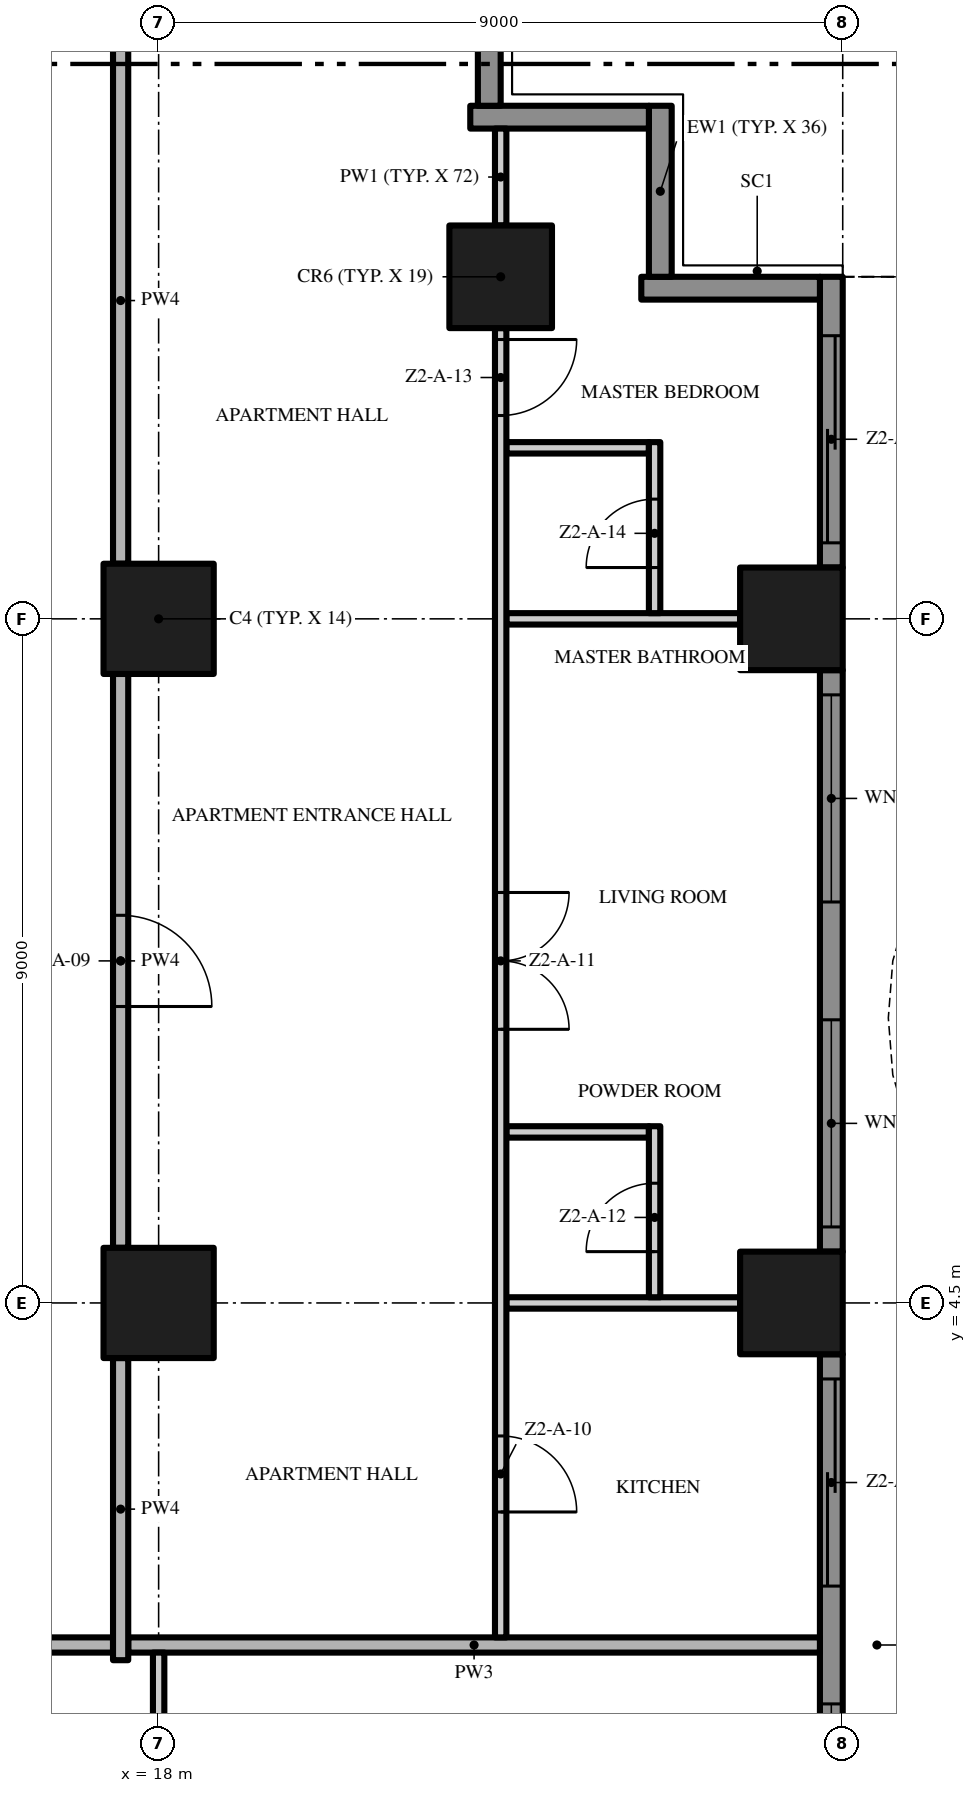
"""IFC4 building model, lengths in metres.
Left out: names, types, materials, properties, quantities, classifications, styles, units other than length and angle.
Written with IfcOpenShell. Run it as: python <this file> out.ifc"""

import sys

from ifc_helpers import new_model, si_unit, direction, frame, frame_2d, origin, origin_2d, place, context, subcontext, project, spatial, polyline, rectangle, outline, extrude, element, fill, save


model = new_model("IFC4")
c1 = context("Model", 3, precision=1e-05, world=origin(), true_north=direction((0.0, 1.0)))
c2 = subcontext(c1, "Body", "Model", "MODEL_VIEW")
j1 = project(units=[si_unit("LENGTHUNIT", "METRE"), si_unit("PLANEANGLEUNIT", "RADIAN")], contexts=[c1])
p1 = place(None, origin())
s1 = spatial("IfcSite", under=j1, at=p1, CompositionType="ELEMENT")
p2 = place(p1, origin())
s2 = spatial("IfcBuilding", under=s1, at=p2, CompositionType="ELEMENT")
p3 = place(p2, frame((0.0, 0.0, 77.0)))
s3 = spatial("IfcBuildingStorey", under=s2, at=p3, CompositionType="ELEMENT", Elevation=77.0)
for number, where, z_axis, x_axis in (
    (1, (18.0, 13.5, 0.0), (0.0, 0.0, 1.0), (1.0, 0.0, 0.0)),
    (2, (18.0, 4.5, 0.0), (0.0, 0.0, 1.0), (1.0, 0.0, 0.0)),
):
    element("IfcColumn", number, at=place(p3, frame(where, z_axis=z_axis, x_axis=x_axis)), inside=s3, PredefinedType="COLUMN", context=c2, shape_type="SweptSolid", body=[
        extrude(rectangle(XDim=1.45, YDim=1.45, at=origin_2d()), origin(), (0.0, 0.0, 1.0), 3.5),
    ])
for number, where, z_axis, x_axis in (
    (3, (26.325, 13.5, 0.0), (0.0, 0.0, 1.0), (1.0, 0.0, 0.0)),
    (4, (22.5, 18.0, 0.0), (0.0, 0.0, 1.0), (1.0, 0.0, 0.0)),
    (5, (26.325, 4.5, 0.0), (0.0, 0.0, 1.0), (1.0, 0.0, 0.0)),
):
    element("IfcColumn", number, at=place(p3, frame(where, z_axis=z_axis, x_axis=x_axis)), inside=s3, PredefinedType="COLUMN", context=c2, shape_type="SweptSolid", body=[
        extrude(rectangle(XDim=1.35, YDim=1.35, at=origin_2d()), origin(), (0.0, 0.0, 1.0), 3.5),
    ])
p4 = place(p3, frame((26.85, 3.825, 0.0), z_axis=(0.0, 0.0, 1.0), x_axis=(0.0, -1.0, 0.0)))
e6 = element("IfcWall", 6, at=p4, inside=s3, PredefinedType="SOLIDWALL", context=c2, shape_type="SweptSolid", body=[
    extrude(rectangle(XDim=7.65, YDim=0.3, at=frame_2d((3.825, 0.0))), origin(), (0.0, 0.0, 1.0), 3.5),
])
p5 = place(p4, frame((4.6, 0.0, 0.45)))
e7 = element("IfcOpeningElement", 7, at=p5, cuts=e6, PredefinedType="OPENING", context=c2, shape_type="SweptSolid", body=[
    extrude(rectangle(XDim=2.725, YDim=2.65, at=frame_2d((1.363, 1.325))), frame((0.0, 0.16, 0.0), z_axis=(0.0, -1.0, 0.0), x_axis=(1.0, 0.0, 0.0)), (0.0, 0.0, 1.0), 0.32),
])
p6 = place(p4, frame((0.325, 0.0, 0.0)))
e8 = element("IfcOpeningElement", 8, at=p6, cuts=e6, PredefinedType="OPENING", context=c2, shape_type="SweptSolid", body=[
    extrude(rectangle(XDim=2.725, YDim=2.4, at=frame_2d((1.363, 1.2))), frame((0.0, 0.16, 0.0), z_axis=(0.0, -1.0, 0.0), x_axis=(1.0, 0.0, 0.0)), (0.0, 0.0, 1.0), 0.32),
])
p7 = place(p3, frame((26.85, 12.825, 0.0), z_axis=(0.0, 0.0, 1.0), x_axis=(0.0, -1.0, 0.0)))
e9 = element("IfcWall", 9, at=p7, inside=s3, PredefinedType="SOLIDWALL", context=c2, shape_type="SweptSolid", body=[
    extrude(rectangle(XDim=7.65, YDim=0.3, at=frame_2d((3.825, 0.0))), origin(), (0.0, 0.0, 1.0), 3.5),
])
p8 = place(p7, frame((4.6, 0.0, 0.45)))
e10 = element("IfcOpeningElement", 10, at=p8, cuts=e9, PredefinedType="OPENING", context=c2, shape_type="SweptSolid", body=[
    extrude(rectangle(XDim=2.725, YDim=2.65, at=frame_2d((1.363, 1.325))), frame((0.0, 0.16, 0.0), z_axis=(0.0, -1.0, 0.0), x_axis=(1.0, 0.0, 0.0)), (0.0, 0.0, 1.0), 0.32),
])
p9 = place(p7, frame((0.325, 0.0, 0.45)))
e11 = element("IfcOpeningElement", 11, at=p9, cuts=e9, PredefinedType="OPENING", context=c2, shape_type="SweptSolid", body=[
    extrude(rectangle(XDim=2.725, YDim=2.65, at=frame_2d((1.363, 1.325))), frame((0.0, 0.16, 0.0), z_axis=(0.0, -1.0, 0.0), x_axis=(1.0, 0.0, 0.0)), (0.0, 0.0, 1.0), 0.32),
])
p10 = place(p3, frame((26.85, 18.0, 0.0), z_axis=(0.0, 0.0, 1.0), x_axis=(0.0, -1.0, 0.0)))
e12 = element("IfcWall", 12, at=p10, inside=s3, PredefinedType="SOLIDWALL", context=c2, shape_type="SweptSolid", body=[
    extrude(rectangle(XDim=3.825, YDim=0.3, at=frame_2d((1.913, 0.0))), origin(), (0.0, 0.0, 1.0), 3.5),
])
p11 = place(p10, frame((0.775, 0.0, 0.0)))
e13 = element("IfcOpeningElement", 13, at=p11, cuts=e12, PredefinedType="OPENING", context=c2, shape_type="SweptSolid", body=[
    extrude(rectangle(XDim=2.725, YDim=2.4, at=frame_2d((1.363, 1.2))), frame((0.0, 0.16, 0.0), z_axis=(0.0, -1.0, 0.0), x_axis=(1.0, 0.0, 0.0)), (0.0, 0.0, 1.0), 0.32),
])
p12 = place(p3, frame((24.35, 17.85, 0.0), z_axis=(0.0, 0.0, 1.0), x_axis=(1.0, 0.0, 0.0)))
e14 = element("IfcWall", 14, at=p12, inside=s3, PredefinedType="SOLIDWALL", context=c2, shape_type="SweptSolid", body=[
    extrude(rectangle(XDim=2.35, YDim=0.3, at=frame_2d((1.175, 0.0))), origin(), (0.0, 0.0, 1.0), 3.5),
])
p13 = place(p3, frame((24.6, 20.25, 0.0), z_axis=(0.0, 0.0, 1.0), x_axis=(0.0, -1.0, 0.0)))
e15 = element("IfcWall", 15, at=p13, inside=s3, PredefinedType="SOLIDWALL", context=c2, shape_type="SweptSolid", body=[
    extrude(rectangle(XDim=2.25, YDim=0.3, at=frame_2d((1.125, 0.0))), origin(), (0.0, 0.0, 1.0), 3.5),
])
p14 = place(p3, frame((22.1, 20.1, 0.0), z_axis=(0.0, 0.0, 1.0), x_axis=(1.0, 0.0, 0.0)))
e16 = element("IfcWall", 16, at=p14, inside=s3, PredefinedType="SOLIDWALL", context=c2, shape_type="SweptSolid", body=[
    extrude(rectangle(XDim=2.35, YDim=0.3, at=frame_2d((1.175, 0.0))), origin(), (0.0, 0.0, 1.0), 3.5),
])
p15 = place(p3, frame((22.35, 22.5, 0.0), z_axis=(0.0, 0.0, 1.0), x_axis=(0.0, -1.0, 0.0)))
e17 = element("IfcWall", 17, at=p15, inside=s3, PredefinedType="SOLIDWALL", context=c2, shape_type="SweptSolid", body=[
    extrude(rectangle(XDim=2.25, YDim=0.3, at=frame_2d((1.125, 0.0))), origin(), (0.0, 0.0, 1.0), 3.5),
])
p16 = place(p3, origin())
e18 = element("IfcWall", 18, at=p16, inside=s3, PredefinedType="USERDEFINED", context=c2, shape_type="SweptSolid", body=[
    extrude(outline(polyline([(28.8, -18.0), (29.505, -16.5), (29.941, -15.0), (30.0, -14.25), (29.941, -13.5), (29.505, -12.0), (28.8, -10.5), (28.095, -9.0), (27.659, -7.5), (27.6, -6.75), (27.659, -6.0), (28.095, -4.5), (28.8, -3.0), (29.505, -1.5), (29.941, 0.0), (30.0, 0.75), (29.941, 1.5), (29.505, 3.0), (28.8, 4.5), (28.095, 6.0), (27.659, 7.5), (27.6, 8.25), (27.659, 9.0), (28.095, 10.5), (28.8, 12.0), (29.505, 13.5), (29.941, 15.0), (30.0, 15.75), (29.941, 16.5), (29.505, 18.0), (29.265, 17.93), (29.694, 16.455), (29.749, 15.75), (29.694, 15.045), (29.271, 13.589), (28.574, 12.106), (27.86, 10.589), (27.411, 9.045), (27.349, 8.25), (27.411, 7.455), (27.86, 5.911), (28.574, 4.394), (29.271, 2.911), (29.694, 1.455), (29.749, 0.75), (29.694, 0.045), (29.271, -1.411), (28.574, -2.894), (27.86, -4.411), (27.411, -5.955), (27.349, -6.75), (27.411, -7.545), (27.86, -9.089), (28.574, -10.606), (29.271, -12.089), (29.694, -13.545), (29.749, -14.25), (29.694, -14.955), (29.271, -16.411), (28.574, -17.894), (28.8, -18.0)])), origin(), (0.0, 0.0, 1.0), 0.9),
])
p17 = place(p3, frame((4.6, 0.0, 0.0), z_axis=(0.0, 0.0, 1.0), x_axis=(1.0, 0.0, 0.0)))
e19 = element("IfcWall", 19, at=p17, inside=s3, PredefinedType="PARTITIONING", context=c2, shape_type="SweptSolid", body=[
    extrude(rectangle(XDim=12.8, YDim=0.2, at=frame_2d((6.4, 0.0))), origin(), (0.0, 0.0, 1.0), 3.5),
])
p18 = place(p3, frame((17.6, 0.0, 0.0), z_axis=(0.0, 0.0, 1.0), x_axis=(1.0, 0.0, 0.0)))
e20 = element("IfcWall", 20, at=p18, inside=s3, PredefinedType="PARTITIONING", context=c2, shape_type="SweptSolid", body=[
    extrude(rectangle(XDim=9.1, YDim=0.2, at=frame_2d((4.55, 0.0))), origin(), (0.0, 0.0, 1.0), 3.5),
])
p19 = place(p3, frame((22.575, 4.5, 0.0), z_axis=(0.0, 0.0, 1.0), x_axis=(1.0, 0.0, 0.0)))
e21 = element("IfcWall", 21, at=p19, inside=s3, PredefinedType="PARTITIONING", context=c2, shape_type="SweptSolid", body=[
    extrude(rectangle(XDim=3.075, YDim=0.15, at=frame_2d((1.538, 0.0))), origin(), (0.0, 0.0, 1.0), 3.5),
])
p20 = place(p3, frame((22.575, 6.75, 0.0), z_axis=(0.0, 0.0, 1.0), x_axis=(1.0, 0.0, 0.0)))
e22 = element("IfcWall", 22, at=p20, inside=s3, PredefinedType="PARTITIONING", context=c2, shape_type="SweptSolid", body=[
    extrude(rectangle(XDim=1.875, YDim=0.15, at=frame_2d((0.938, 0.0))), origin(), (0.0, 0.0, 1.0), 3.5),
])
p21 = place(p3, frame((22.575, 13.5, 0.0), z_axis=(0.0, 0.0, 1.0), x_axis=(1.0, 0.0, 0.0)))
e23 = element("IfcWall", 23, at=p21, inside=s3, PredefinedType="PARTITIONING", context=c2, shape_type="SweptSolid", body=[
    extrude(rectangle(XDim=3.075, YDim=0.15, at=frame_2d((1.538, 0.0))), origin(), (0.0, 0.0, 1.0), 3.5),
])
p22 = place(p3, frame((22.575, 15.75, 0.0), z_axis=(0.0, 0.0, 1.0), x_axis=(1.0, 0.0, 0.0)))
e24 = element("IfcWall", 24, at=p22, inside=s3, PredefinedType="PARTITIONING", context=c2, shape_type="SweptSolid", body=[
    extrude(rectangle(XDim=1.875, YDim=0.15, at=frame_2d((0.938, 0.0))), origin(), (0.0, 0.0, 1.0), 3.5),
])
p23 = place(p3, frame((17.5, -0.2, 0.0), z_axis=(0.0, 0.0, 1.0), x_axis=(0.0, 1.0, 0.0)))
e25 = element("IfcWall", 25, at=p23, inside=s3, PredefinedType="PARTITIONING", context=c2, shape_type="SweptSolid", body=[
    extrude(rectangle(XDim=3.975, YDim=0.2, at=frame_2d((1.988, 0.0))), origin(), (0.0, 0.0, 1.0), 3.5),
])
p24 = place(p3, frame((17.5, 12.775, 0.0), z_axis=(0.0, 0.0, 1.0), x_axis=(0.0, -1.0, 0.0)))
e26 = element("IfcWall", 26, at=p24, inside=s3, PredefinedType="PARTITIONING", context=c2, shape_type="SweptSolid", body=[
    extrude(rectangle(XDim=7.55, YDim=0.2, at=frame_2d((3.775, 0.0))), origin(), (0.0, 0.0, 1.0), 3.5),
])
p25 = place(p24, frame((3.175, 0.0, 0.0)))
e27 = element("IfcOpeningElement", 27, at=p25, cuts=e26, PredefinedType="OPENING", context=c2, shape_type="SweptSolid", body=[
    extrude(rectangle(XDim=1.2, YDim=2.4, at=frame_2d((0.6, 1.2))), frame((0.0, 0.11, 0.0), z_axis=(0.0, -1.0, 0.0), x_axis=(1.0, 0.0, 0.0)), (0.0, 0.0, 1.0), 0.22),
])
p26 = place(p3, frame((17.5, 14.225, 0.0), z_axis=(0.0, 0.0, 1.0), x_axis=(0.0, 1.0, 0.0)))
e28 = element("IfcWall", 28, at=p26, inside=s3, PredefinedType="PARTITIONING", context=c2, shape_type="SweptSolid", body=[
    extrude(rectangle(XDim=6.925, YDim=0.2, at=frame_2d((3.462, 0.0))), origin(), (0.0, 0.0, 1.0), 3.5),
])
p27 = place(p3, frame((18.0, -0.1, 0.0), z_axis=(0.0, 0.0, 1.0), x_axis=(0.0, -1.0, 0.0)))
e29 = element("IfcWall", 29, at=p27, inside=s3, PredefinedType="PARTITIONING", context=c2, shape_type="SweptSolid", body=[
    extrude(rectangle(XDim=3.675, YDim=0.15, at=frame_2d((1.837, 0.0))), origin(), (0.0, 0.0, 1.0), 3.5),
])
p28 = place(p27, frame((1.675, 0.0, 0.0)))
e30 = element("IfcOpeningElement", 30, at=p28, cuts=e29, PredefinedType="OPENING", context=c2, shape_type="SweptSolid", body=[
    extrude(rectangle(XDim=1.0, YDim=2.4, at=frame_2d((0.5, 1.2))), frame((0.0, 0.085, 0.0), z_axis=(0.0, -1.0, 0.0), x_axis=(1.0, 0.0, 0.0)), (0.0, 0.0, 1.0), 0.17),
])
p29 = place(p3, frame((22.5, 17.325, 0.0), z_axis=(0.0, 0.0, 1.0), x_axis=(0.0, -1.0, 0.0)))
e31 = element("IfcWall", 31, at=p29, inside=s3, PredefinedType="PARTITIONING", context=c2, shape_type="SweptSolid", body=[
    extrude(rectangle(XDim=17.225, YDim=0.15, at=frame_2d((8.613, 0.0))), origin(), (0.0, 0.0, 1.0), 3.5),
])
p30 = place(p29, frame((14.575, 0.0, 0.0)))
e32 = element("IfcOpeningElement", 32, at=p30, cuts=e31, PredefinedType="OPENING", context=c2, shape_type="SweptSolid", body=[
    extrude(rectangle(XDim=1.0, YDim=2.4, at=frame_2d((0.5, 1.2))), frame((0.0, 0.085, 0.0), z_axis=(0.0, -1.0, 0.0), x_axis=(1.0, 0.0, 0.0)), (0.0, 0.0, 1.0), 0.17),
])
p31 = place(p29, frame((7.425, 0.0, 0.0)))
e33 = element("IfcOpeningElement", 33, at=p31, cuts=e31, PredefinedType="OPENING", context=c2, shape_type="SweptSolid", body=[
    extrude(rectangle(XDim=1.8, YDim=2.4, at=frame_2d((0.9, 1.2))), frame((0.0, 0.085, 0.0), z_axis=(0.0, -1.0, 0.0), x_axis=(1.0, 0.0, 0.0)), (0.0, 0.0, 1.0), 0.17),
])
p32 = place(p29, frame((0.15, 0.0, 0.0)))
e34 = element("IfcOpeningElement", 34, at=p32, cuts=e31, PredefinedType="OPENING", context=c2, shape_type="SweptSolid", body=[
    extrude(rectangle(XDim=1.0, YDim=2.4, at=frame_2d((0.5, 1.2))), frame((0.0, 0.085, 0.0), z_axis=(0.0, -1.0, 0.0), x_axis=(1.0, 0.0, 0.0)), (0.0, 0.0, 1.0), 0.17),
])
p33 = place(p3, frame((22.5, 18.675, 0.0), z_axis=(0.0, 0.0, 1.0), x_axis=(0.0, 1.0, 0.0)))
e35 = element("IfcWall", 35, at=p33, inside=s3, PredefinedType="PARTITIONING", context=c2, shape_type="SweptSolid", body=[
    extrude(rectangle(XDim=1.275, YDim=0.15, at=frame_2d((0.637, 0.0))), origin(), (0.0, 0.0, 1.0), 3.5),
])
p34 = place(p3, frame((24.525, 4.575, 0.0), z_axis=(0.0, 0.0, 1.0), x_axis=(0.0, 1.0, 0.0)))
e36 = element("IfcWall", 36, at=p34, inside=s3, PredefinedType="PARTITIONING", context=c2, shape_type="SweptSolid", body=[
    extrude(rectangle(XDim=2.25, YDim=0.15, at=frame_2d((1.125, 0.0))), origin(), (0.0, 0.0, 1.0), 3.5),
])
p35 = place(p34, frame((0.6, 0.0, 0.0)))
e37 = element("IfcOpeningElement", 37, at=p35, cuts=e36, PredefinedType="OPENING", context=c2, shape_type="SweptSolid", body=[
    extrude(rectangle(XDim=0.9, YDim=2.1, at=frame_2d((0.45, 1.05))), frame((0.0, 0.085, 0.0), z_axis=(0.0, -1.0, 0.0), x_axis=(1.0, 0.0, 0.0)), (0.0, 0.0, 1.0), 0.17),
])
p36 = place(p3, frame((24.525, 13.575, 0.0), z_axis=(0.0, 0.0, 1.0), x_axis=(0.0, 1.0, 0.0)))
e38 = element("IfcWall", 38, at=p36, inside=s3, PredefinedType="PARTITIONING", context=c2, shape_type="SweptSolid", body=[
    extrude(rectangle(XDim=2.25, YDim=0.15, at=frame_2d((1.125, 0.0))), origin(), (0.0, 0.0, 1.0), 3.5),
])
p37 = place(p36, frame((0.6, 0.0, 0.0)))
e39 = element("IfcOpeningElement", 39, at=p37, cuts=e38, PredefinedType="OPENING", context=c2, shape_type="SweptSolid", body=[
    extrude(rectangle(XDim=0.9, YDim=2.1, at=frame_2d((0.45, 1.05))), frame((0.0, 0.085, 0.0), z_axis=(0.0, -1.0, 0.0), x_axis=(1.0, 0.0, 0.0)), (0.0, 0.0, 1.0), 0.17),
])
p38 = place(p5, origin())
e40 = element("IfcWindow", 40, at=p38, inside=s3, PartitioningType="SINGLE_PANEL", PredefinedType="WINDOW", context=c2, shape_type="SweptSolid", body=[
    extrude(rectangle(XDim=2.725, YDim=2.65, at=frame_2d((1.363, 1.325))), frame((0.0, 0.03, 0.0), z_axis=(0.0, -1.0, 0.0), x_axis=(1.0, 0.0, 0.0)), (0.0, 0.0, 1.0), 0.06),
])
fill(e7, e40)
p39 = place(p6, origin())
e41 = element("IfcDoor", 41, at=p39, inside=s3, OperationType="SINGLE_SWING_LEFT", PredefinedType="DOOR", context=c2, shape_type="SweptSolid", body=[
    extrude(rectangle(XDim=2.725, YDim=2.4, at=frame_2d((1.363, 1.2))), frame((0.0, 0.025, 0.0), z_axis=(0.0, -1.0, 0.0), x_axis=(1.0, 0.0, 0.0)), (0.0, 0.0, 1.0), 0.05),
])
fill(e8, e41)
p40 = place(p8, origin())
e42 = element("IfcWindow", 42, at=p40, inside=s3, PartitioningType="SINGLE_PANEL", PredefinedType="WINDOW", context=c2, shape_type="SweptSolid", body=[
    extrude(rectangle(XDim=2.725, YDim=2.65, at=frame_2d((1.363, 1.325))), frame((0.0, 0.03, 0.0), z_axis=(0.0, -1.0, 0.0), x_axis=(1.0, 0.0, 0.0)), (0.0, 0.0, 1.0), 0.06),
])
fill(e10, e42)
p41 = place(p9, origin())
e43 = element("IfcWindow", 43, at=p41, inside=s3, PartitioningType="SINGLE_PANEL", PredefinedType="WINDOW", context=c2, shape_type="SweptSolid", body=[
    extrude(rectangle(XDim=2.725, YDim=2.65, at=frame_2d((1.363, 1.325))), frame((0.0, 0.03, 0.0), z_axis=(0.0, -1.0, 0.0), x_axis=(1.0, 0.0, 0.0)), (0.0, 0.0, 1.0), 0.06),
])
fill(e11, e43)
p42 = place(p11, origin())
e44 = element("IfcDoor", 44, at=p42, inside=s3, OperationType="SINGLE_SWING_LEFT", PredefinedType="DOOR", context=c2, shape_type="SweptSolid", body=[
    extrude(rectangle(XDim=2.725, YDim=2.4, at=frame_2d((1.363, 1.2))), frame((0.0, 0.025, 0.0), z_axis=(0.0, -1.0, 0.0), x_axis=(1.0, 0.0, 0.0)), (0.0, 0.0, 1.0), 0.05),
])
fill(e13, e44)
p43 = place(p25, origin())
e45 = element("IfcDoor", 45, at=p43, inside=s3, OperationType="SINGLE_SWING_RIGHT", PredefinedType="DOOR", context=c2, shape_type="SweptSolid", body=[
    extrude(rectangle(XDim=1.2, YDim=2.4, at=frame_2d((0.6, 1.2))), frame((0.0, 0.025, 0.0), z_axis=(0.0, -1.0, 0.0), x_axis=(1.0, 0.0, 0.0)), (0.0, 0.0, 1.0), 0.05),
])
fill(e27, e45)
p44 = place(p30, origin())
e46 = element("IfcDoor", 46, at=p44, inside=s3, OperationType="SINGLE_SWING_RIGHT", PredefinedType="DOOR", context=c2, shape_type="SweptSolid", body=[
    extrude(rectangle(XDim=1.0, YDim=2.4, at=frame_2d((0.5, 1.2))), frame((0.0, 0.025, 0.0), z_axis=(0.0, -1.0, 0.0), x_axis=(1.0, 0.0, 0.0)), (0.0, 0.0, 1.0), 0.05),
])
fill(e32, e46)
p45 = place(p31, origin())
e47 = element("IfcDoor", 47, at=p45, inside=s3, OperationType="DOUBLE_DOOR_SINGLE_SWING", PredefinedType="DOOR", context=c2, shape_type="SweptSolid", body=[
    extrude(rectangle(XDim=1.8, YDim=2.4, at=frame_2d((0.9, 1.2))), frame((0.0, 0.025, 0.0), z_axis=(0.0, -1.0, 0.0), x_axis=(1.0, 0.0, 0.0)), (0.0, 0.0, 1.0), 0.05),
])
fill(e33, e47)
p46 = place(p35, origin())
e48 = element("IfcDoor", 48, at=p46, inside=s3, OperationType="SINGLE_SWING_LEFT", PredefinedType="DOOR", context=c2, shape_type="SweptSolid", body=[
    extrude(rectangle(XDim=0.9, YDim=2.1, at=frame_2d((0.45, 1.05))), frame((0.0, 0.025, 0.0), z_axis=(0.0, -1.0, 0.0), x_axis=(1.0, 0.0, 0.0)), (0.0, 0.0, 1.0), 0.05),
])
fill(e37, e48)
p47 = place(p32, origin())
e49 = element("IfcDoor", 49, at=p47, inside=s3, OperationType="SINGLE_SWING_LEFT", PredefinedType="DOOR", context=c2, shape_type="SweptSolid", body=[
    extrude(rectangle(XDim=1.0, YDim=2.4, at=frame_2d((0.5, 1.2))), frame((0.0, 0.025, 0.0), z_axis=(0.0, -1.0, 0.0), x_axis=(1.0, 0.0, 0.0)), (0.0, 0.0, 1.0), 0.05),
])
fill(e34, e49)
p48 = place(p37, origin())
e50 = element("IfcDoor", 50, at=p48, inside=s3, OperationType="SINGLE_SWING_LEFT", PredefinedType="DOOR", context=c2, shape_type="SweptSolid", body=[
    extrude(rectangle(XDim=0.9, YDim=2.1, at=frame_2d((0.45, 1.05))), frame((0.0, 0.025, 0.0), z_axis=(0.0, -1.0, 0.0), x_axis=(1.0, 0.0, 0.0)), (0.0, 0.0, 1.0), 0.05),
])
fill(e39, e50)
save(model, sys.argv[1])
